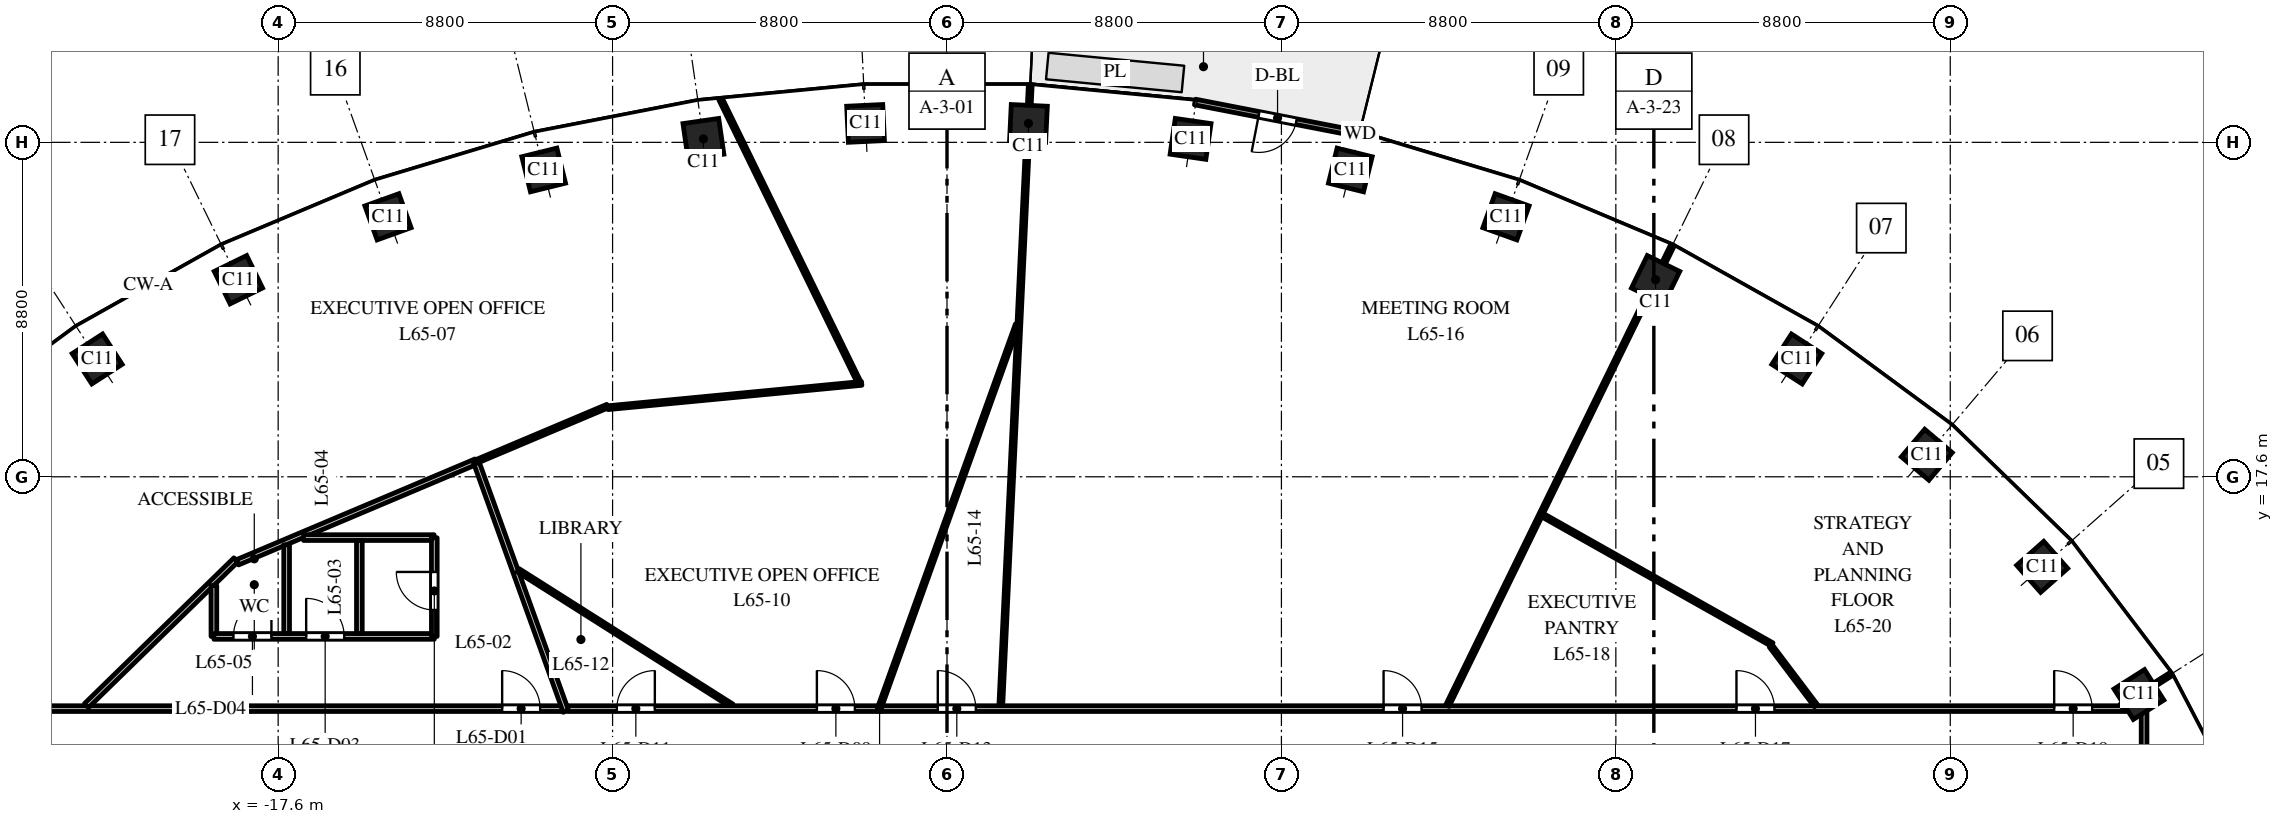
"""IFC4 building model, lengths in metres.
Left out: names, types, materials, properties, quantities, classifications, styles, units other than length and angle.
Written with IfcOpenShell. Run it as: python <this file> out.ifc"""

import sys

from ifc_helpers import new_model, si_unit, direction, frame, frame_2d, origin, origin_2d, place, context, subcontext, project, spatial, rectangle, extrude, element, fill, save


model = new_model("IFC4")
c1 = context("Model", 3, precision=1e-05, world=origin(), true_north=direction((0.0, 1.0)))
c2 = subcontext(c1, "Body", "Model", "MODEL_VIEW")
j1 = project(units=[si_unit("LENGTHUNIT", "METRE"), si_unit("PLANEANGLEUNIT", "RADIAN")], contexts=[c1])
p1 = place(None, origin())
s1 = spatial("IfcSite", under=j1, at=p1, CompositionType="ELEMENT")
p2 = place(p1, origin())
s2 = spatial("IfcBuilding", under=s1, at=p2, CompositionType="ELEMENT")
p3 = place(p2, frame((0.0, 0.0, 303.0)))
s3 = spatial("IfcBuildingStorey", under=s2, at=p3, CompositionType="ELEMENT", Elevation=303.0)
for number, where, z_axis, x_axis in (
    (1, (31.365, 11.871, 0.0), (0.0, 0.0, 1.0), (-0.535, 0.845, 0.0)),
    (2, (28.819, 15.23, 0.0), (0.0, 0.0, 1.0), (-0.663, 0.749, 0.0)),
    (3, (25.783, 18.18, 0.0), (0.0, 0.0, 1.0), (-0.763, 0.646, 0.0)),
    (4, (22.362, 20.7, 0.0), (0.0, 0.0, 1.0), (-0.84, 0.542, 0.0)),
    (5, (18.646, 22.785, 0.0), (0.0, 0.0, 1.0), (-0.898, 0.439, 0.0)),
    (6, (14.709, 24.441, 0.0), (0.0, 0.0, 1.0), (-0.941, 0.338, 0.0)),
    (7, (10.613, 25.674, 0.0), (0.0, 0.0, 1.0), (-0.971, 0.24, 0.0)),
    (8, (6.409, 26.491, 0.0), (0.0, 0.0, 1.0), (-0.99, 0.143, 0.0)),
    (9, (2.143, 26.898, 0.0), (0.0, 0.0, 1.0), (-0.999, 0.048, 0.0)),
    (10, (-2.143, 26.898, 0.0), (0.0, 0.0, 1.0), (-0.999, -0.048, 0.0)),
    (11, (-6.409, 26.491, 0.0), (0.0, 0.0, 1.0), (-0.99, -0.143, 0.0)),
    (12, (-10.613, 25.674, 0.0), (0.0, 0.0, 1.0), (-0.971, -0.24, 0.0)),
    (13, (-14.709, 24.441, 0.0), (0.0, 0.0, 1.0), (-0.941, -0.338, 0.0)),
    (14, (-18.646, 22.785, 0.0), (0.0, 0.0, 1.0), (-0.898, -0.439, 0.0)),
    (15, (-22.362, 20.7, 0.0), (0.0, 0.0, 1.0), (-0.84, -0.542, 0.0)),
):
    element("IfcColumn", number, at=place(p3, frame(where, z_axis=z_axis, x_axis=x_axis)), inside=s3, PredefinedType="COLUMN", context=c2, shape_type="SweptSolid", body=[
        extrude(rectangle(XDim=0.95, YDim=0.95, at=origin_2d()), origin(), (0.0, 0.0, 1.0), 4.0),
    ])
p4 = place(p3, frame((10.871, 26.617, 0.0), z_axis=(0.0, 0.0, 1.0), x_axis=(-0.981631174778, 0.190788460615, 0.0)))
e16 = element("IfcWall", 16, at=p4, inside=s3, PredefinedType="STANDARD", context=c2, shape_type="SweptSolid", body=[
    extrude(rectangle(XDim=4.426, YDim=0.15, at=frame_2d((2.213, 0.0))), origin(), (0.0, 0.0, 1.0), 3.7),
])
p5 = place(p4, frame((1.713, 0.0, 0.0)))
e17 = element("IfcOpeningElement", 17, at=p5, cuts=e16, PredefinedType="OPENING", context=c2, shape_type="SweptSolid", body=[
    extrude(rectangle(XDim=1.0, YDim=2.4, at=frame_2d((0.5, 1.2))), frame((0.0, 0.085, 0.0), z_axis=(0.0, -1.0, 0.0), x_axis=(1.0, 0.0, 0.0)), (0.0, 0.0, 1.0), 0.17),
])
p6 = place(p3, frame((-31.5, 11.5, 0.0), z_axis=(0.0, 0.0, 1.0), x_axis=(1.0, 0.0, 0.0)))
e18 = element("IfcWall", 18, at=p6, inside=s3, PredefinedType="PARTITIONING", context=c2, shape_type="SweptSolid", body=[
    extrude(rectangle(XDim=21.432, YDim=0.15, at=frame_2d((10.716, 0.0))), origin(), (0.0, 0.0, 1.0), 2.75),
])
p7 = place(p6, frame((19.794, 0.0, 0.0)))
e19 = element("IfcOpeningElement", 19, at=p7, cuts=e18, PredefinedType="OPENING", context=c2, shape_type="SweptSolid", body=[
    extrude(rectangle(XDim=1.0, YDim=2.1, at=frame_2d((0.5, 1.05))), frame((0.0, 0.085, 0.0), z_axis=(0.0, -1.0, 0.0), x_axis=(1.0, 0.0, 0.0)), (0.0, 0.0, 1.0), 0.17),
])
p8 = place(p6, frame((1.381, 0.0, 0.0)))
e20 = element("IfcOpeningElement", 20, at=p8, cuts=e18, PredefinedType="OPENING", context=c2, shape_type="SweptSolid", body=[
    extrude(rectangle(XDim=1.0, YDim=2.1, at=frame_2d((0.5, 1.05))), frame((0.0, 0.085, 0.0), z_axis=(0.0, -1.0, 0.0), x_axis=(1.0, 0.0, 0.0)), (0.0, 0.0, 1.0), 0.17),
])
p9 = place(p3, frame((-22.645, 11.578, 0.0), z_axis=(0.0, 0.0, 1.0), x_axis=(0.715959052993, 0.698142273779, 0.0)))
e21 = element("IfcWall", 21, at=p9, inside=s3, PredefinedType="PARTITIONING", context=c2, shape_type="SweptSolid", body=[
    extrude(rectangle(XDim=5.495, YDim=0.15, at=frame_2d((2.748, 0.0))), origin(), (0.0, 0.0, 1.0), 2.75),
])
p10 = place(p3, frame((-19.291, 13.4, 0.0), z_axis=(0.0, 0.0, 1.0), x_axis=(0.0, 1.0, 0.0)))
e22 = element("IfcWall", 22, at=p10, inside=s3, PredefinedType="PARTITIONING", context=c2, shape_type="SweptSolid", body=[
    extrude(rectangle(XDim=1.339, YDim=0.15, at=frame_2d((0.669, 0.0))), origin(), (0.0, 0.0, 1.0), 2.75),
])
p11 = place(p3, frame((-19.291, 13.4, 0.0), z_axis=(0.0, 0.0, 1.0), x_axis=(1.0, 0.0, 0.0)))
e23 = element("IfcWall", 23, at=p11, inside=s3, PredefinedType="PARTITIONING", context=c2, shape_type="SweptSolid", body=[
    extrude(rectangle(XDim=5.8, YDim=0.15, at=frame_2d((2.9, 0.0))), origin(), (0.0, 0.0, 1.0), 2.75),
])
p12 = place(p11, frame((2.428, 0.0, 0.0)))
e24 = element("IfcOpeningElement", 24, at=p12, cuts=e23, PredefinedType="OPENING", context=c2, shape_type="SweptSolid", body=[
    extrude(rectangle(XDim=1.0, YDim=2.1, at=frame_2d((0.5, 1.05))), frame((0.0, 0.085, 0.0), z_axis=(0.0, -1.0, 0.0), x_axis=(1.0, 0.0, 0.0)), (0.0, 0.0, 1.0), 0.17),
])
p13 = place(p11, frame((0.514, 0.0, 0.0)))
e25 = element("IfcOpeningElement", 25, at=p13, cuts=e23, PredefinedType="OPENING", context=c2, shape_type="SweptSolid", body=[
    extrude(rectangle(XDim=1.0, YDim=2.1, at=frame_2d((0.5, 1.05))), frame((0.0, 0.085, 0.0), z_axis=(0.0, -1.0, 0.0), x_axis=(1.0, 0.0, 0.0)), (0.0, 0.0, 1.0), 0.17),
])
p14 = place(p3, frame((-18.669, 15.35, 0.0), z_axis=(0.0, 0.0, 1.0), x_axis=(0.9212963597, 0.388861180376, 0.0)))
e26 = element("IfcWall", 26, at=p14, inside=s3, PredefinedType="PARTITIONING", context=c2, shape_type="SweptSolid", body=[
    extrude(rectangle(XDim=6.812, YDim=0.15, at=frame_2d((3.406, 0.0))), origin(), (0.0, 0.0, 1.0), 2.75),
])
p15 = place(p3, frame((-17.377, 13.475, 0.0), z_axis=(0.0, 0.0, 1.0), x_axis=(0.0, 1.0, 0.0)))
e27 = element("IfcWall", 27, at=p15, inside=s3, PredefinedType="PARTITIONING", context=c2, shape_type="SweptSolid", body=[
    extrude(rectangle(XDim=2.335, YDim=0.15, at=frame_2d((1.167, 0.0))), origin(), (0.0, 0.0, 1.0), 3.7),
])
p16 = place(p3, frame((-16.932, 16.0, 0.0), z_axis=(0.0, 0.0, 1.0), x_axis=(1.0, 0.0, 0.0)))
e28 = element("IfcWall", 28, at=p16, inside=s3, PredefinedType="PARTITIONING", context=c2, shape_type="SweptSolid", body=[
    extrude(rectangle(XDim=3.437, YDim=0.15, at=frame_2d((1.718, 0.0))), origin(), (0.0, 0.0, 1.0), 3.7),
])
p17 = place(p3, frame((-15.463, 13.475, 0.0), z_axis=(0.0, 0.0, 1.0), x_axis=(0.0, 1.0, 0.0)))
e29 = element("IfcWall", 29, at=p17, inside=s3, PredefinedType="PARTITIONING", context=c2, shape_type="SweptSolid", body=[
    extrude(rectangle(XDim=2.45, YDim=0.15, at=frame_2d((1.225, 0.0))), origin(), (0.0, 0.0, 1.0), 3.7),
])
p18 = place(p3, frame((-13.491, 13.4, 0.0), z_axis=(0.0, 0.0, 1.0), x_axis=(0.0, 1.0, 0.0)))
e30 = element("IfcWall", 30, at=p18, inside=s3, PredefinedType="PARTITIONING", context=c2, shape_type="SweptSolid", body=[
    extrude(rectangle(XDim=2.596, YDim=0.15, at=frame_2d((1.298, 0.0))), origin(), (0.0, 0.0, 1.0), 3.7),
])
p19 = place(p18, frame((0.696, 0.0, 0.0)))
e31 = element("IfcOpeningElement", 31, at=p19, cuts=e30, PredefinedType="OPENING", context=c2, shape_type="SweptSolid", body=[
    extrude(rectangle(XDim=1.0, YDim=2.1, at=frame_2d((0.5, 1.05))), frame((0.0, 0.085, 0.0), z_axis=(0.0, -1.0, 0.0), x_axis=(1.0, 0.0, 0.0)), (0.0, 0.0, 1.0), 0.17),
])
p20 = place(p3, frame((-12.393, 17.999, 0.0), z_axis=(0.0, 0.0, 1.0), x_axis=(0.338565934799, -0.94094266977, 0.0)))
e32 = element("IfcWall", 32, at=p20, inside=s3, PredefinedType="PARTITIONING", context=c2, shape_type="SweptSolid", body=[
    extrude(rectangle(XDim=6.982, YDim=0.15, at=frame_2d((3.491, 0.0))), origin(), (0.0, 0.0, 1.0), 2.75),
])
p21 = place(p3, frame((-12.393, 17.999, 0.0), z_axis=(0.0, 0.0, 1.0), x_axis=(0.921243349635, 0.388986748816, 0.0)))
e33 = element("IfcWall", 33, at=p21, inside=s3, PredefinedType="PARTITIONING", context=c2, shape_type="SweptSolid", body=[
    extrude(rectangle(XDim=3.756, YDim=0.1, at=frame_2d((1.878, 0.0))), origin(), (0.0, 0.0, 1.0), 3.7),
])
p22 = place(p3, frame((-11.285, 15.14, 0.0), z_axis=(0.0, 0.0, 1.0), x_axis=(0.844821283955, -0.535048594219, 0.0)))
e34 = element("IfcWall", 34, at=p22, inside=s3, PredefinedType="PARTITIONING", context=c2, shape_type="SweptSolid", body=[
    extrude(rectangle(XDim=6.663, YDim=0.1, at=frame_2d((3.332, 0.0))), origin(), (0.0, 0.0, 1.0), 3.7),
])
p23 = place(p3, frame((-9.976, 11.5, 0.0), z_axis=(0.0, 0.0, 1.0), x_axis=(1.0, 0.0, 0.0)))
e35 = element("IfcWall", 35, at=p23, inside=s3, PredefinedType="PARTITIONING", context=c2, shape_type="SweptSolid", body=[
    extrude(rectangle(XDim=8.244, YDim=0.15, at=frame_2d((4.122, 0.0))), origin(), (0.0, 0.0, 1.0), 2.75),
])
p24 = place(p23, frame((6.552, 0.0, 0.0)))
e36 = element("IfcOpeningElement", 36, at=p24, cuts=e35, PredefinedType="OPENING", context=c2, shape_type="SweptSolid", body=[
    extrude(rectangle(XDim=1.0, YDim=2.1, at=frame_2d((0.5, 1.05))), frame((0.0, 0.085, 0.0), z_axis=(0.0, -1.0, 0.0), x_axis=(1.0, 0.0, 0.0)), (0.0, 0.0, 1.0), 0.17),
])
p25 = place(p23, frame((1.288, 0.0, 0.0)))
e37 = element("IfcOpeningElement", 37, at=p25, cuts=e35, PredefinedType="OPENING", context=c2, shape_type="SweptSolid", body=[
    extrude(rectangle(XDim=1.0, YDim=2.1, at=frame_2d((0.5, 1.05))), frame((0.0, 0.085, 0.0), z_axis=(0.0, -1.0, 0.0), x_axis=(1.0, 0.0, 0.0)), (0.0, 0.0, 1.0), 0.17),
])
p26 = place(p3, frame((-8.923, 19.418, 0.0), z_axis=(0.0, 0.0, 1.0), x_axis=(0.995454324827, 0.095240155306, 0.0)))
e38 = element("IfcWall", 38, at=p26, inside=s3, PredefinedType="PARTITIONING", context=c2, shape_type="SweptSolid", body=[
    extrude(rectangle(XDim=6.708, YDim=0.1, at=frame_2d((3.354, 0.0))), origin(), (0.0, 0.0, 1.0), 2.85),
])
p27 = place(p3, frame((-5.958, 27.538, 0.0), z_axis=(0.0, 0.0, 1.0), x_axis=(0.439269892729, -0.898355142102, 0.0)))
e39 = element("IfcWall", 39, at=p27, inside=s3, PredefinedType="PARTITIONING", context=c2, shape_type="SweptSolid", body=[
    extrude(rectangle(XDim=8.28, YDim=0.1, at=frame_2d((4.14, 0.0))), origin(), (0.0, 0.0, 1.0), 3.0),
])
p28 = place(p3, frame((-1.757, 11.579, 0.0), z_axis=(0.0, 0.0, 1.0), x_axis=(0.338365558832, 0.941014744091, 0.0)))
e40 = element("IfcWall", 40, at=p28, inside=s3, PredefinedType="PARTITIONING", context=c2, shape_type="SweptSolid", body=[
    extrude(rectangle(XDim=10.651, YDim=0.1, at=frame_2d((5.326, 0.0))), origin(), (0.0, 0.0, 1.0), 2.85),
])
p29 = place(p3, frame((-1.774, 11.5, 0.0), z_axis=(0.0, 0.0, 1.0), x_axis=(1.0, 0.0, 0.0)))
e41 = element("IfcWall", 41, at=p29, inside=s3, PredefinedType="PARTITIONING", context=c2, shape_type="SweptSolid", body=[
    extrude(rectangle(XDim=33.274, YDim=0.15, at=frame_2d((16.637, 0.0))), origin(), (0.0, 0.0, 1.0), 2.75),
])
p30 = place(p29, frame((1.532, 0.0, 0.0)))
e42 = element("IfcOpeningElement", 42, at=p30, cuts=e41, PredefinedType="OPENING", context=c2, shape_type="SweptSolid", body=[
    extrude(rectangle(XDim=1.0, YDim=2.1, at=frame_2d((0.5, 1.05))), frame((0.0, 0.085, 0.0), z_axis=(0.0, -1.0, 0.0), x_axis=(1.0, 0.0, 0.0)), (0.0, 0.0, 1.0), 0.17),
])
p31 = place(p29, frame((13.262, 0.0, 0.0)))
e43 = element("IfcOpeningElement", 43, at=p31, cuts=e41, PredefinedType="OPENING", context=c2, shape_type="SweptSolid", body=[
    extrude(rectangle(XDim=1.0, YDim=2.1, at=frame_2d((0.5, 1.05))), frame((0.0, 0.085, 0.0), z_axis=(0.0, -1.0, 0.0), x_axis=(1.0, 0.0, 0.0)), (0.0, 0.0, 1.0), 0.17),
])
p32 = place(p29, frame((22.548, 0.0, 0.0)))
e44 = element("IfcOpeningElement", 44, at=p32, cuts=e41, PredefinedType="OPENING", context=c2, shape_type="SweptSolid", body=[
    extrude(rectangle(XDim=1.0, YDim=2.1, at=frame_2d((0.5, 1.05))), frame((0.0, 0.085, 0.0), z_axis=(0.0, -1.0, 0.0), x_axis=(1.0, 0.0, 0.0)), (0.0, 0.0, 1.0), 0.17),
])
p33 = place(p29, frame((30.908, 0.0, 0.0)))
e45 = element("IfcOpeningElement", 45, at=p33, cuts=e41, PredefinedType="OPENING", context=c2, shape_type="SweptSolid", body=[
    extrude(rectangle(XDim=1.0, YDim=2.1, at=frame_2d((0.5, 1.05))), frame((0.0, 0.085, 0.0), z_axis=(0.0, -1.0, 0.0), x_axis=(1.0, 0.0, 0.0)), (0.0, 0.0, 1.0), 0.17),
])
p34 = place(p3, frame((1.416, 11.582, 0.0), z_axis=(0.0, 0.0, 1.0), x_axis=(0.047380514939, 0.99887691274, 0.0)))
e46 = element("IfcWall", 46, at=p34, inside=s3, PredefinedType="PARTITIONING", context=c2, shape_type="SweptSolid", body=[
    extrude(rectangle(XDim=16.334, YDim=0.1, at=frame_2d((8.167, 0.0))), origin(), (0.0, 0.0, 1.0), 3.0),
])
p35 = place(p3, frame((13.168, 11.579, 0.0), z_axis=(0.0, 0.0, 1.0), x_axis=(0.439180235984, 0.898398976135, 0.0)))
e47 = element("IfcWall", 47, at=p35, inside=s3, PredefinedType="PARTITIONING", context=c2, shape_type="SweptSolid", body=[
    extrude(rectangle(XDim=13.475, YDim=0.1, at=frame_2d((6.738, 0.0))), origin(), (0.0, 0.0, 1.0), 3.0),
])
p36 = place(p3, frame((15.673, 16.589, 0.0), z_axis=(0.0, 0.0, 1.0), x_axis=(0.871190555515, -0.490945023381, 0.0)))
e48 = element("IfcWall", 48, at=p36, inside=s3, PredefinedType="PARTITIONING", context=c2, shape_type="SweptSolid", body=[
    extrude(rectangle(XDim=6.932, YDim=0.1, at=frame_2d((3.466, 0.0))), origin(), (0.0, 0.0, 1.0), 3.7),
])
p37 = place(p3, frame((21.679, 13.148, 0.0), z_axis=(0.0, 0.0, 1.0), x_axis=(0.602755856466, -0.797925671661, 0.0)))
e49 = element("IfcWall", 49, at=p37, inside=s3, PredefinedType="PARTITIONING", context=c2, shape_type="SweptSolid", body=[
    extrude(rectangle(XDim=1.968, YDim=0.1, at=frame_2d((0.984, 0.0))), origin(), (0.0, 0.0, 1.0), 2.75),
])
p38 = place(p3, frame((30.897, 11.575, 0.0), z_axis=(0.0, 0.0, 1.0), x_axis=(0.844757626245, 0.535149094086, 0.0)))
e50 = element("IfcWall", 50, at=p38, inside=s3, PredefinedType="PARTITIONING", context=c2, shape_type="SweptSolid", body=[
    extrude(rectangle(XDim=1.557, YDim=0.1, at=frame_2d((0.778, 0.0))), origin(), (0.0, 0.0, 1.0), 3.0),
])
p39 = place(p3, frame((31.5, 8.5, 0.0), z_axis=(0.0, 0.0, 1.0), x_axis=(0.0, 1.0, 0.0)))
e51 = element("IfcWall", 51, at=p39, inside=s3, PredefinedType="PARTITIONING", context=c2, shape_type="SweptSolid", body=[
    extrude(rectangle(XDim=3.0, YDim=0.15, at=frame_2d((1.5, 0.0))), origin(), (0.0, 0.0, 1.0), 3.0),
])
p40 = place(p5, origin())
e52 = element("IfcDoor", 52, at=p40, inside=s3, OperationType="SINGLE_SWING_RIGHT", PredefinedType="DOOR", context=c2, shape_type="SweptSolid", body=[
    extrude(rectangle(XDim=1.0, YDim=2.4, at=frame_2d((0.5, 1.2))), frame((0.0, 0.025, 0.0), z_axis=(0.0, -1.0, 0.0), x_axis=(1.0, 0.0, 0.0)), (0.0, 0.0, 1.0), 0.05),
])
fill(e17, e52)
p41 = place(p7, origin())
e53 = element("IfcDoor", 53, at=p41, inside=s3, OperationType="SINGLE_SWING_LEFT", PredefinedType="DOOR", context=c2, shape_type="SweptSolid", body=[
    extrude(rectangle(XDim=1.0, YDim=2.1, at=frame_2d((0.5, 1.05))), frame((0.0, 0.025, 0.0), z_axis=(0.0, -1.0, 0.0), x_axis=(1.0, 0.0, 0.0)), (0.0, 0.0, 1.0), 0.05),
])
fill(e19, e53)
p42 = place(p19, origin())
e54 = element("IfcDoor", 54, at=p42, inside=s3, OperationType="SINGLE_SWING_RIGHT", PredefinedType="DOOR", context=c2, shape_type="SweptSolid", body=[
    extrude(rectangle(XDim=1.0, YDim=2.1, at=frame_2d((0.5, 1.05))), frame((0.0, 0.025, 0.0), z_axis=(0.0, -1.0, 0.0), x_axis=(1.0, 0.0, 0.0)), (0.0, 0.0, 1.0), 0.05),
])
fill(e31, e54)
p43 = place(p12, origin())
e55 = element("IfcDoor", 55, at=p43, inside=s3, OperationType="SINGLE_SWING_LEFT", PredefinedType="DOOR", context=c2, shape_type="SweptSolid", body=[
    extrude(rectangle(XDim=1.0, YDim=2.1, at=frame_2d((0.5, 1.05))), frame((0.0, 0.025, 0.0), z_axis=(0.0, -1.0, 0.0), x_axis=(1.0, 0.0, 0.0)), (0.0, 0.0, 1.0), 0.05),
])
fill(e24, e55)
p44 = place(p13, origin())
e56 = element("IfcDoor", 56, at=p44, inside=s3, OperationType="SINGLE_SWING_RIGHT", PredefinedType="DOOR", context=c2, shape_type="SweptSolid", body=[
    extrude(rectangle(XDim=1.0, YDim=2.1, at=frame_2d((0.5, 1.05))), frame((0.0, 0.025, 0.0), z_axis=(0.0, -1.0, 0.0), x_axis=(1.0, 0.0, 0.0)), (0.0, 0.0, 1.0), 0.05),
])
fill(e25, e56)
p45 = place(p24, origin())
e57 = element("IfcDoor", 57, at=p45, inside=s3, OperationType="SINGLE_SWING_LEFT", PredefinedType="DOOR", context=c2, shape_type="SweptSolid", body=[
    extrude(rectangle(XDim=1.0, YDim=2.1, at=frame_2d((0.5, 1.05))), frame((0.0, 0.025, 0.0), z_axis=(0.0, -1.0, 0.0), x_axis=(1.0, 0.0, 0.0)), (0.0, 0.0, 1.0), 0.05),
])
fill(e36, e57)
p46 = place(p25, origin())
e58 = element("IfcDoor", 58, at=p46, inside=s3, OperationType="SINGLE_SWING_RIGHT", PredefinedType="DOOR", context=c2, shape_type="SweptSolid", body=[
    extrude(rectangle(XDim=1.0, YDim=2.1, at=frame_2d((0.5, 1.05))), frame((0.0, 0.025, 0.0), z_axis=(0.0, -1.0, 0.0), x_axis=(1.0, 0.0, 0.0)), (0.0, 0.0, 1.0), 0.05),
])
fill(e37, e58)
p47 = place(p30, origin())
e59 = element("IfcDoor", 59, at=p47, inside=s3, OperationType="SINGLE_SWING_LEFT", PredefinedType="DOOR", context=c2, shape_type="SweptSolid", body=[
    extrude(rectangle(XDim=1.0, YDim=2.1, at=frame_2d((0.5, 1.05))), frame((0.0, 0.025, 0.0), z_axis=(0.0, -1.0, 0.0), x_axis=(1.0, 0.0, 0.0)), (0.0, 0.0, 1.0), 0.05),
])
fill(e42, e59)
p48 = place(p31, origin())
e60 = element("IfcDoor", 60, at=p48, inside=s3, OperationType="SINGLE_SWING_LEFT", PredefinedType="DOOR", context=c2, shape_type="SweptSolid", body=[
    extrude(rectangle(XDim=1.0, YDim=2.1, at=frame_2d((0.5, 1.05))), frame((0.0, 0.025, 0.0), z_axis=(0.0, -1.0, 0.0), x_axis=(1.0, 0.0, 0.0)), (0.0, 0.0, 1.0), 0.05),
])
fill(e43, e60)
p49 = place(p32, origin())
e61 = element("IfcDoor", 61, at=p49, inside=s3, OperationType="SINGLE_SWING_LEFT", PredefinedType="DOOR", context=c2, shape_type="SweptSolid", body=[
    extrude(rectangle(XDim=1.0, YDim=2.1, at=frame_2d((0.5, 1.05))), frame((0.0, 0.025, 0.0), z_axis=(0.0, -1.0, 0.0), x_axis=(1.0, 0.0, 0.0)), (0.0, 0.0, 1.0), 0.05),
])
fill(e44, e61)
p50 = place(p33, origin())
e62 = element("IfcDoor", 62, at=p50, inside=s3, OperationType="SINGLE_SWING_LEFT", PredefinedType="DOOR", context=c2, shape_type="SweptSolid", body=[
    extrude(rectangle(XDim=1.0, YDim=2.1, at=frame_2d((0.5, 1.05))), frame((0.0, 0.025, 0.0), z_axis=(0.0, -1.0, 0.0), x_axis=(1.0, 0.0, 0.0)), (0.0, 0.0, 1.0), 0.05),
])
fill(e45, e62)
save(model, sys.argv[1])
